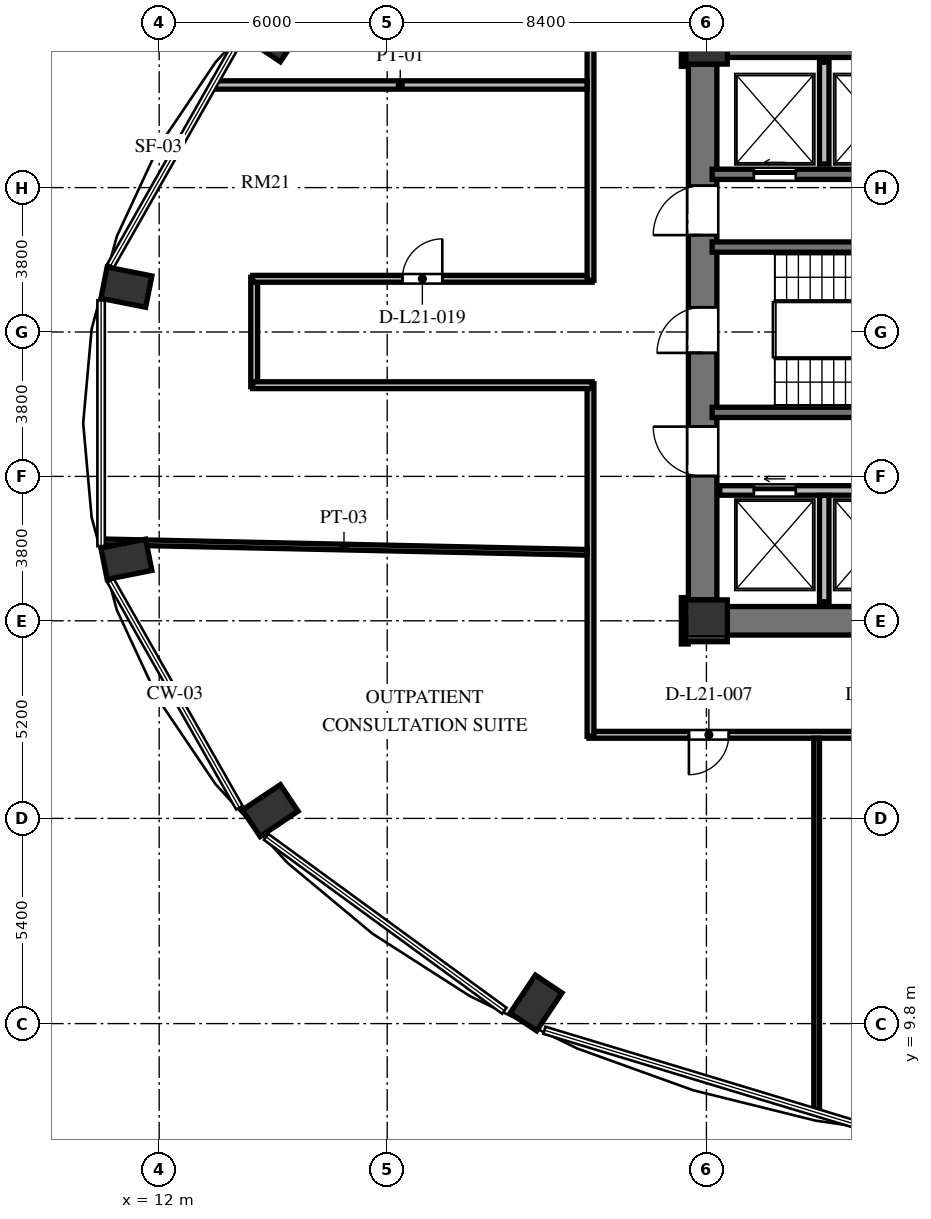
"""IFC4 building model, lengths in metres.
Left out: names, types, materials, properties, quantities, classifications, styles, units other than length and angle.
Written with IfcOpenShell. Run it as: python <this file> out.ifc"""

import sys

from ifc_helpers import new_model, si_unit, direction, frame, frame_2d, origin, origin_2d, place, context, subcontext, project, spatial, rectangle, extrude, element, fill, save


model = new_model("IFC4")
c1 = context("Model", 3, precision=1e-05, world=origin(), true_north=direction((0.0, 1.0)))
c2 = subcontext(c1, "Body", "Model", "MODEL_VIEW")
j1 = project(units=[si_unit("LENGTHUNIT", "METRE"), si_unit("PLANEANGLEUNIT", "RADIAN")], contexts=[c1])
p1 = place(None, origin())
s1 = spatial("IfcSite", under=j1, at=p1, CompositionType="ELEMENT")
p2 = place(p1, origin())
s2 = spatial("IfcBuilding", under=s1, at=p2, CompositionType="ELEMENT")
p3 = place(p2, frame((0.0, 0.0, 85.392)))
s3 = spatial("IfcBuildingStorey", under=s2, at=p3, CompositionType="ELEMENT", Elevation=85.392)
for number, where, z_axis, x_axis in (
    (1, (14.922, 35.795, 0.0), (0.0, 0.0, 1.0), (-0.831, 0.556, 0.0)),
    (2, (11.137, 29.18, 0.0), (0.0, 0.0, 1.0), (-0.981, 0.195, 0.0)),
    (3, (11.137, 22.02, 0.0), (0.0, 0.0, 1.0), (-0.981, -0.195, 0.0)),
    (4, (14.922, 15.405, 0.0), (0.0, 0.0, 1.0), (-0.831, -0.556, 0.0)),
    (5, (21.916, 10.343, 0.0), (0.0, 0.0, 1.0), (-0.556, -0.831, 0.0)),
):
    element("IfcColumn", number, at=place(p3, frame(where, z_axis=z_axis, x_axis=x_axis)), inside=s3, PredefinedType="COLUMN", context=c2, shape_type="SweptSolid", body=[
        extrude(rectangle(XDim=1.2, YDim=0.84, at=origin_2d()), origin(), (0.0, 0.0, 1.0), 3.648),
    ])
for number, where, z_axis, x_axis in (
    (6, (26.4, 20.4, 0.0), (0.0, 0.0, 1.0), (1.0, 0.0, 0.0)),
    (7, (26.4, 35.6, 0.0), (0.0, 0.0, 1.0), (1.0, 0.0, 0.0)),
):
    element("IfcColumn", number, at=place(p3, frame(where, z_axis=z_axis, x_axis=x_axis)), inside=s3, PredefinedType="COLUMN", context=c2, shape_type="SweptSolid", body=[
        extrude(rectangle(XDim=1.1, YDim=1.1, at=origin_2d()), origin(), (0.0, 0.0, 1.0), 3.648),
    ])
p4 = place(p3, frame((26.3, 20.95, 0.0), z_axis=(0.0, 0.0, 1.0), x_axis=(0.0, 1.0, 0.0)))
e8 = element("IfcWall", 8, at=p4, inside=s3, PredefinedType="SHEAR", context=c2, shape_type="SweptSolid", body=[
    extrude(rectangle(XDim=14.1, YDim=0.75, at=frame_2d((7.05, 0.0))), origin(), (0.0, 0.0, 1.0), 3.648),
])
p5 = place(p4, frame((6.5, 0.0, 0.0)))
e9 = element("IfcOpeningElement", 9, at=p5, cuts=e8, PredefinedType="OPENING", context=c2, shape_type="SweptSolid", body=[
    extrude(rectangle(XDim=1.2, YDim=2.15, at=frame_2d((0.6, 1.075))), frame((0.0, 0.385, 0.0), z_axis=(0.0, -1.0, 0.0), x_axis=(1.0, 0.0, 0.0)), (0.0, 0.0, 1.0), 0.77),
])
p6 = place(p4, frame((9.6, 0.0, 0.0)))
e10 = element("IfcOpeningElement", 10, at=p6, cuts=e8, PredefinedType="OPENING", context=c2, shape_type="SweptSolid", body=[
    extrude(rectangle(XDim=1.3, YDim=2.2, at=frame_2d((0.65, 1.1))), frame((0.0, 0.385, 0.0), z_axis=(0.0, -1.0, 0.0), x_axis=(1.0, 0.0, 0.0)), (0.0, 0.0, 1.0), 0.77),
])
p7 = place(p4, frame((3.26, 0.0, 0.0)))
e11 = element("IfcOpeningElement", 11, at=p7, cuts=e8, PredefinedType="OPENING", context=c2, shape_type="SweptSolid", body=[
    extrude(rectangle(XDim=1.3, YDim=2.2, at=frame_2d((0.65, 1.1))), frame((0.0, 0.385, 0.0), z_axis=(0.0, -1.0, 0.0), x_axis=(1.0, 0.0, 0.0)), (0.0, 0.0, 1.0), 0.77),
])
for number, where, z_axis, x_axis in (
    (12, (26.95, 20.4, 0.0), (0.0, 0.0, 1.0), (1.0, 0.0, 0.0)),
    (13, (26.95, 35.6, 0.0), (0.0, 0.0, 1.0), (1.0, 0.0, 0.0)),
):
    element("IfcWall", number, at=place(p3, frame(where, z_axis=z_axis, x_axis=x_axis)), inside=s3, PredefinedType="SHEAR", context=c2, shape_type="SweptSolid", body=[
        extrude(rectangle(XDim=5.375, YDim=0.75, at=frame_2d((2.688, 0.0))), origin(), (0.0, 0.0, 1.0), 3.648),
    ])
for number, where, z_axis, x_axis in (
    (14, (26.55, 30.235, 0.0), (0.0, 0.0, 1.0), (1.0, 0.0, 0.0)),
    (15, (26.55, 25.885, 0.0), (0.0, 0.0, 1.0), (1.0, 0.0, 0.0)),
):
    element("IfcWall", number, at=place(p3, frame(where, z_axis=z_axis, x_axis=x_axis)), inside=s3, PredefinedType="SHEAR", context=c2, shape_type="SweptSolid", body=[
        extrude(rectangle(XDim=7.985, YDim=0.27, at=frame_2d((3.992, 0.0))), origin(), (0.0, 0.0, 1.0), 3.648),
    ])
p8 = place(p3, frame((26.55, 32.15, 0.0), z_axis=(0.0, 0.0, 1.0), x_axis=(1.0, 0.0, 0.0)))
e16 = element("IfcWall", 16, at=p8, inside=s3, PredefinedType="SHEAR", context=c2, shape_type="SweptSolid", body=[
    extrude(rectangle(XDim=16.4, YDim=0.27, at=frame_2d((8.2, 0.0))), origin(), (0.0, 0.0, 1.0), 3.648),
])
p9 = place(p8, frame((1.1, 0.0, 0.0)))
e17 = element("IfcOpeningElement", 17, at=p9, cuts=e16, PredefinedType="OPENING", context=c2, shape_type="SweptSolid", body=[
    extrude(rectangle(XDim=1.1, YDim=2.2, at=frame_2d((0.55, 1.1))), frame((0.0, 0.145, 0.0), z_axis=(0.0, -1.0, 0.0), x_axis=(1.0, 0.0, 0.0)), (0.0, 0.0, 1.0), 0.29),
])
p10 = place(p8, frame((3.7, 0.0, 0.0)))
e18 = element("IfcOpeningElement", 18, at=p10, cuts=e16, PredefinedType="OPENING", context=c2, shape_type="SweptSolid", body=[
    extrude(rectangle(XDim=1.1, YDim=2.2, at=frame_2d((0.55, 1.1))), frame((0.0, 0.145, 0.0), z_axis=(0.0, -1.0, 0.0), x_axis=(1.0, 0.0, 0.0)), (0.0, 0.0, 1.0), 0.29),
])
p11 = place(p8, frame((6.5, 0.0, 0.0)))
e19 = element("IfcOpeningElement", 19, at=p11, cuts=e16, PredefinedType="OPENING", context=c2, shape_type="SweptSolid", body=[
    extrude(rectangle(XDim=1.1, YDim=2.2, at=frame_2d((0.55, 1.1))), frame((0.0, 0.145, 0.0), z_axis=(0.0, -1.0, 0.0), x_axis=(1.0, 0.0, 0.0)), (0.0, 0.0, 1.0), 0.29),
])
p12 = place(p8, frame((9.1, 0.0, 0.0)))
e20 = element("IfcOpeningElement", 20, at=p12, cuts=e16, PredefinedType="OPENING", context=c2, shape_type="SweptSolid", body=[
    extrude(rectangle(XDim=1.1, YDim=2.2, at=frame_2d((0.55, 1.1))), frame((0.0, 0.145, 0.0), z_axis=(0.0, -1.0, 0.0), x_axis=(1.0, 0.0, 0.0)), (0.0, 0.0, 1.0), 0.29),
])
p13 = place(p8, frame((11.9, 0.0, 0.0)))
e21 = element("IfcOpeningElement", 21, at=p13, cuts=e16, PredefinedType="OPENING", context=c2, shape_type="SweptSolid", body=[
    extrude(rectangle(XDim=1.1, YDim=2.2, at=frame_2d((0.55, 1.1))), frame((0.0, 0.145, 0.0), z_axis=(0.0, -1.0, 0.0), x_axis=(1.0, 0.0, 0.0)), (0.0, 0.0, 1.0), 0.29),
])
p14 = place(p8, frame((14.5, 0.0, 0.0)))
e22 = element("IfcOpeningElement", 22, at=p14, cuts=e16, PredefinedType="OPENING", context=c2, shape_type="SweptSolid", body=[
    extrude(rectangle(XDim=1.1, YDim=2.2, at=frame_2d((0.55, 1.1))), frame((0.0, 0.145, 0.0), z_axis=(0.0, -1.0, 0.0), x_axis=(1.0, 0.0, 0.0)), (0.0, 0.0, 1.0), 0.29),
])
p15 = place(p3, frame((26.75, 23.83, 0.0), z_axis=(0.0, 0.0, 1.0), x_axis=(1.0, 0.0, 0.0)))
e23 = element("IfcWall", 23, at=p15, inside=s3, PredefinedType="SOLIDWALL", context=c2, shape_type="SweptSolid", body=[
    extrude(rectangle(XDim=16.2, YDim=0.25, at=frame_2d((8.1, 0.0))), origin(), (0.0, 0.0, 1.0), 3.428),
])
p16 = place(p15, frame((0.9, 0.0, 0.0)))
e24 = element("IfcOpeningElement", 24, at=p16, cuts=e23, PredefinedType="OPENING", context=c2, shape_type="SweptSolid", body=[
    extrude(rectangle(XDim=1.1, YDim=2.2, at=frame_2d((0.55, 1.1))), frame((0.0, 0.135, 0.0), z_axis=(0.0, -1.0, 0.0), x_axis=(1.0, 0.0, 0.0)), (0.0, 0.0, 1.0), 0.27),
])
p17 = place(p15, frame((3.5, 0.0, 0.0)))
e25 = element("IfcOpeningElement", 25, at=p17, cuts=e23, PredefinedType="OPENING", context=c2, shape_type="SweptSolid", body=[
    extrude(rectangle(XDim=1.1, YDim=2.2, at=frame_2d((0.55, 1.1))), frame((0.0, 0.135, 0.0), z_axis=(0.0, -1.0, 0.0), x_axis=(1.0, 0.0, 0.0)), (0.0, 0.0, 1.0), 0.27),
])
p18 = place(p15, frame((6.3, 0.0, 0.0)))
e26 = element("IfcOpeningElement", 26, at=p18, cuts=e23, PredefinedType="OPENING", context=c2, shape_type="SweptSolid", body=[
    extrude(rectangle(XDim=1.1, YDim=2.2, at=frame_2d((0.55, 1.1))), frame((0.0, 0.135, 0.0), z_axis=(0.0, -1.0, 0.0), x_axis=(1.0, 0.0, 0.0)), (0.0, 0.0, 1.0), 0.27),
])
p19 = place(p15, frame((8.9, 0.0, 0.0)))
e27 = element("IfcOpeningElement", 27, at=p19, cuts=e23, PredefinedType="OPENING", context=c2, shape_type="SweptSolid", body=[
    extrude(rectangle(XDim=1.1, YDim=2.2, at=frame_2d((0.55, 1.1))), frame((0.0, 0.135, 0.0), z_axis=(0.0, -1.0, 0.0), x_axis=(1.0, 0.0, 0.0)), (0.0, 0.0, 1.0), 0.27),
])
p20 = place(p15, frame((11.7, 0.0, 0.0)))
e28 = element("IfcOpeningElement", 28, at=p20, cuts=e23, PredefinedType="OPENING", context=c2, shape_type="SweptSolid", body=[
    extrude(rectangle(XDim=1.1, YDim=2.2, at=frame_2d((0.55, 1.1))), frame((0.0, 0.135, 0.0), z_axis=(0.0, -1.0, 0.0), x_axis=(1.0, 0.0, 0.0)), (0.0, 0.0, 1.0), 0.27),
])
p21 = place(p15, frame((14.15, 0.0, 0.0)))
e29 = element("IfcOpeningElement", 29, at=p21, cuts=e23, PredefinedType="OPENING", context=c2, shape_type="SweptSolid", body=[
    extrude(rectangle(XDim=1.4, YDim=2.3, at=frame_2d((0.7, 1.15))), frame((0.0, 0.135, 0.0), z_axis=(0.0, -1.0, 0.0), x_axis=(1.0, 0.0, 0.0)), (0.0, 0.0, 1.0), 0.27),
])
p22 = place(p3, frame((29.5, 32.42, 0.0), z_axis=(0.0, 0.0, 1.0), x_axis=(0.0, 1.0, 0.0)))
e30 = element("IfcWall", 30, at=p22, inside=s3, PredefinedType="SOLIDWALL", context=c2, shape_type="SweptSolid", body=[
    extrude(rectangle(XDim=2.68, YDim=0.25, at=frame_2d((1.34, 0.0))), origin(), (0.0, 0.0, 1.0), 3.428),
])
p23 = place(p3, frame((29.5, 20.9, 0.0), z_axis=(0.0, 0.0, 1.0), x_axis=(0.0, 1.0, 0.0)))
e31 = element("IfcWall", 31, at=p23, inside=s3, PredefinedType="SOLIDWALL", context=c2, shape_type="SweptSolid", body=[
    extrude(rectangle(XDim=2.8, YDim=0.25, at=frame_2d((1.4, 0.0))), origin(), (0.0, 0.0, 1.0), 3.428),
])
p24 = place(p3, frame((14.5, 26.56, 0.0), z_axis=(0.0, 0.0, 1.0), x_axis=(0.0, 1.0, 0.0)))
e32 = element("IfcWall", 32, at=p24, inside=s3, PredefinedType="PARTITIONING", context=c2, shape_type="SweptSolid", body=[
    extrude(rectangle(XDim=2.88, YDim=0.18, at=frame_2d((1.44, 0.0))), origin(), (0.0, 0.0, 1.0), 3.013),
])
p25 = place(p3, frame((14.46, 29.4, 0.0), z_axis=(0.0, 0.0, 1.0), x_axis=(1.0, 0.0, 0.0)))
e33 = element("IfcWall", 33, at=p25, inside=s3, PredefinedType="PARTITIONING", context=c2, shape_type="SweptSolid", body=[
    extrude(rectangle(XDim=8.93, YDim=0.18, at=frame_2d((4.465, 0.0))), origin(), (0.0, 0.0, 1.0), 3.428),
])
p26 = place(p25, frame((3.94, 0.0, 0.0)))
e34 = element("IfcOpeningElement", 34, at=p26, cuts=e33, PredefinedType="OPENING", context=c2, shape_type="SweptSolid", body=[
    extrude(rectangle(XDim=1.05, YDim=2.15, at=frame_2d((0.525, 1.075))), frame((0.0, 0.1, 0.0), z_axis=(0.0, -1.0, 0.0), x_axis=(1.0, 0.0, 0.0)), (0.0, 0.0, 1.0), 0.2),
])
p27 = place(p3, frame((23.35, 29.36, 0.0), z_axis=(0.0, 0.0, 1.0), x_axis=(0.0, 1.0, 0.0)))
e35 = element("IfcWall", 35, at=p27, inside=s3, PredefinedType="PARTITIONING", context=c2, shape_type="SweptSolid", body=[
    extrude(rectangle(XDim=9.43, YDim=0.18, at=frame_2d((4.715, 0.0))), origin(), (0.0, 0.0, 1.0), 3.428),
])
for number, where, z_axis, x_axis in (
    (36, (25.83, 36.21, 0.0), (0.0, 0.0, 1.0), (0.0, -1.0, 0.0)),
    (37, (25.83, 21.01, 0.0), (0.0, 0.0, 1.0), (0.0, -1.0, 0.0)),
):
    element("IfcWall", number, at=place(p3, frame(where, z_axis=z_axis, x_axis=x_axis)), inside=s3, PredefinedType="PARTITIONING", context=c2, shape_type="SweptSolid", body=[
        extrude(rectangle(XDim=1.22, YDim=0.18, at=frame_2d((0.61, 0.0))), origin(), (0.0, 0.0, 1.0), 3.428),
    ])
p28 = place(p3, frame((45.24, 17.4, 0.0), z_axis=(0.0, 0.0, 1.0), x_axis=(-1.0, 0.0, 0.0)))
e38 = element("IfcWall", 38, at=p28, inside=s3, PredefinedType="PARTITIONING", context=c2, shape_type="SweptSolid", body=[
    extrude(rectangle(XDim=21.93, YDim=0.18, at=frame_2d((10.965, 0.0))), origin(), (0.0, 0.0, 1.0), 3.053),
])
p29 = place(p28, frame((18.251, 0.0, 0.0)))
e39 = element("IfcOpeningElement", 39, at=p29, cuts=e38, PredefinedType="OPENING", context=c2, shape_type="SweptSolid", body=[
    extrude(rectangle(XDim=1.05, YDim=2.15, at=frame_2d((0.525, 1.075))), frame((0.0, 0.1, 0.0), z_axis=(0.0, -1.0, 0.0), x_axis=(1.0, 0.0, 0.0)), (0.0, 0.0, 1.0), 0.2),
])
p30 = place(p28, frame((13.515, 0.0, 0.0)))
e40 = element("IfcOpeningElement", 40, at=p30, cuts=e38, PredefinedType="OPENING", context=c2, shape_type="SweptSolid", body=[
    extrude(rectangle(XDim=1.05, YDim=2.15, at=frame_2d((0.525, 1.075))), frame((0.0, 0.1, 0.0), z_axis=(0.0, -1.0, 0.0), x_axis=(1.0, 0.0, 0.0)), (0.0, 0.0, 1.0), 0.2),
])
p31 = place(p28, frame((9.515, 0.0, 0.0)))
e41 = element("IfcOpeningElement", 41, at=p31, cuts=e38, PredefinedType="OPENING", context=c2, shape_type="SweptSolid", body=[
    extrude(rectangle(XDim=1.05, YDim=2.15, at=frame_2d((0.525, 1.075))), frame((0.0, 0.1, 0.0), z_axis=(0.0, -1.0, 0.0), x_axis=(1.0, 0.0, 0.0)), (0.0, 0.0, 1.0), 0.2),
])
p32 = place(p28, frame((4.743, 0.0, 0.0)))
e42 = element("IfcOpeningElement", 42, at=p32, cuts=e38, PredefinedType="OPENING", context=c2, shape_type="SweptSolid", body=[
    extrude(rectangle(XDim=1.4, YDim=2.2, at=frame_2d((0.7, 1.1))), frame((0.0, 0.1, 0.0), z_axis=(0.0, -1.0, 0.0), x_axis=(1.0, 0.0, 0.0)), (0.0, 0.0, 1.0), 0.2),
])
p33 = place(p28, frame((1.907, 0.0, 0.0)))
e43 = element("IfcOpeningElement", 43, at=p33, cuts=e38, PredefinedType="OPENING", context=c2, shape_type="SweptSolid", body=[
    extrude(rectangle(XDim=1.05, YDim=2.15, at=frame_2d((0.525, 1.075))), frame((0.0, 0.1, 0.0), z_axis=(0.0, -1.0, 0.0), x_axis=(1.0, 0.0, 0.0)), (0.0, 0.0, 1.0), 0.2),
])
p34 = place(p3, frame((23.35, 17.36, 0.0), z_axis=(0.0, 0.0, 1.0), x_axis=(0.0, 1.0, 0.0)))
e44 = element("IfcWall", 44, at=p34, inside=s3, PredefinedType="PARTITIONING", context=c2, shape_type="SweptSolid", body=[
    extrude(rectangle(XDim=9.28, YDim=0.18, at=frame_2d((4.64, 0.0))), origin(), (0.0, 0.0, 1.0), 3.428),
])
p35 = place(p3, frame((23.39, 26.6, 0.0), z_axis=(0.0, 0.0, 1.0), x_axis=(-1.0, 0.0, 0.0)))
e45 = element("IfcWall", 45, at=p35, inside=s3, PredefinedType="PARTITIONING", context=c2, shape_type="SweptSolid", body=[
    extrude(rectangle(XDim=8.93, YDim=0.18, at=frame_2d((4.465, 0.0))), origin(), (0.0, 0.0, 1.0), 3.428),
])
p36 = place(p3, frame((10.465, 22.479, 0.0), z_axis=(0.0, 0.0, 1.0), x_axis=(0.999765147572, -0.021671402821, 0.0)))
e46 = element("IfcWall", 46, at=p36, inside=s3, PredefinedType="PARTITIONING", context=c2, shape_type="SweptSolid", body=[
    extrude(rectangle(XDim=12.798, YDim=0.15, at=frame_2d((6.399, 0.0))), origin(), (0.0, 0.0, 1.0), 3.428),
])
p37 = place(p3, frame((13.426, 34.5, 0.0), z_axis=(0.0, 0.0, 1.0), x_axis=(1.0, 0.0, 0.0)))
e47 = element("IfcWall", 47, at=p37, inside=s3, PredefinedType="PARTITIONING", context=c2, shape_type="SweptSolid", body=[
    extrude(rectangle(XDim=9.834, YDim=0.22, at=frame_2d((4.917, 0.0))), origin(), (0.0, 0.0, 1.0), 3.428),
])
p38 = place(p3, frame((29.3, 7.473, 0.0), z_axis=(0.0, 0.0, 1.0), x_axis=(0.0, 1.0, 0.0)))
e48 = element("IfcWall", 48, at=p38, inside=s3, PredefinedType="PARTITIONING", context=c2, shape_type="SweptSolid", body=[
    extrude(rectangle(XDim=9.837, YDim=0.15, at=frame_2d((4.918, 0.0))), origin(), (0.0, 0.0, 1.0), 3.428),
])
p39 = place(p5, origin())
e49 = element("IfcDoor", 49, at=p39, inside=s3, OperationType="SINGLE_SWING_LEFT", PredefinedType="DOOR", context=c2, shape_type="SweptSolid", body=[
    extrude(rectangle(XDim=1.2, YDim=2.15, at=frame_2d((0.6, 1.075))), frame((0.0, 0.025, 0.0), z_axis=(0.0, -1.0, 0.0), x_axis=(1.0, 0.0, 0.0)), (0.0, 0.0, 1.0), 0.05),
])
fill(e9, e49)
p40 = place(p6, origin())
e50 = element("IfcDoor", 50, at=p40, inside=s3, OperationType="SINGLE_SWING_LEFT", PredefinedType="DOOR", context=c2, shape_type="SweptSolid", body=[
    extrude(rectangle(XDim=1.3, YDim=2.2, at=frame_2d((0.65, 1.1))), frame((0.0, 0.025, 0.0), z_axis=(0.0, -1.0, 0.0), x_axis=(1.0, 0.0, 0.0)), (0.0, 0.0, 1.0), 0.05),
])
fill(e10, e50)
p41 = place(p7, origin())
e51 = element("IfcDoor", 51, at=p41, inside=s3, OperationType="SINGLE_SWING_RIGHT", PredefinedType="DOOR", context=c2, shape_type="SweptSolid", body=[
    extrude(rectangle(XDim=1.3, YDim=2.2, at=frame_2d((0.65, 1.1))), frame((0.0, 0.025, 0.0), z_axis=(0.0, -1.0, 0.0), x_axis=(1.0, 0.0, 0.0)), (0.0, 0.0, 1.0), 0.05),
])
fill(e11, e51)
p42 = place(p9, origin())
e52 = element("IfcDoor", 52, at=p42, inside=s3, OperationType="SLIDING_TO_LEFT", PredefinedType="DOOR", context=c2, shape_type="SweptSolid", body=[
    extrude(rectangle(XDim=1.1, YDim=2.2, at=frame_2d((0.55, 1.1))), frame((0.0, 0.025, 0.0), z_axis=(0.0, -1.0, 0.0), x_axis=(1.0, 0.0, 0.0)), (0.0, 0.0, 1.0), 0.05),
])
fill(e17, e52)
p43 = place(p16, origin())
e53 = element("IfcDoor", 53, at=p43, inside=s3, OperationType="SLIDING_TO_LEFT", PredefinedType="DOOR", context=c2, shape_type="SweptSolid", body=[
    extrude(rectangle(XDim=1.1, YDim=2.2, at=frame_2d((0.55, 1.1))), frame((0.0, 0.025, 0.0), z_axis=(0.0, -1.0, 0.0), x_axis=(1.0, 0.0, 0.0)), (0.0, 0.0, 1.0), 0.05),
])
fill(e24, e53)
p44 = place(p29, origin())
e54 = element("IfcDoor", 54, at=p44, inside=s3, OperationType="SINGLE_SWING_RIGHT", PredefinedType="DOOR", context=c2, shape_type="SweptSolid", body=[
    extrude(rectangle(XDim=1.05, YDim=2.15, at=frame_2d((0.525, 1.075))), frame((0.0, 0.025, 0.0), z_axis=(0.0, -1.0, 0.0), x_axis=(1.0, 0.0, 0.0)), (0.0, 0.0, 1.0), 0.05),
])
fill(e39, e54)
p45 = place(p26, origin())
e55 = element("IfcDoor", 55, at=p45, inside=s3, OperationType="SINGLE_SWING_RIGHT", PredefinedType="DOOR", context=c2, shape_type="SweptSolid", body=[
    extrude(rectangle(XDim=1.05, YDim=2.15, at=frame_2d((0.525, 1.075))), frame((0.0, 0.025, 0.0), z_axis=(0.0, -1.0, 0.0), x_axis=(1.0, 0.0, 0.0)), (0.0, 0.0, 1.0), 0.05),
])
fill(e34, e55)
save(model, sys.argv[1])
